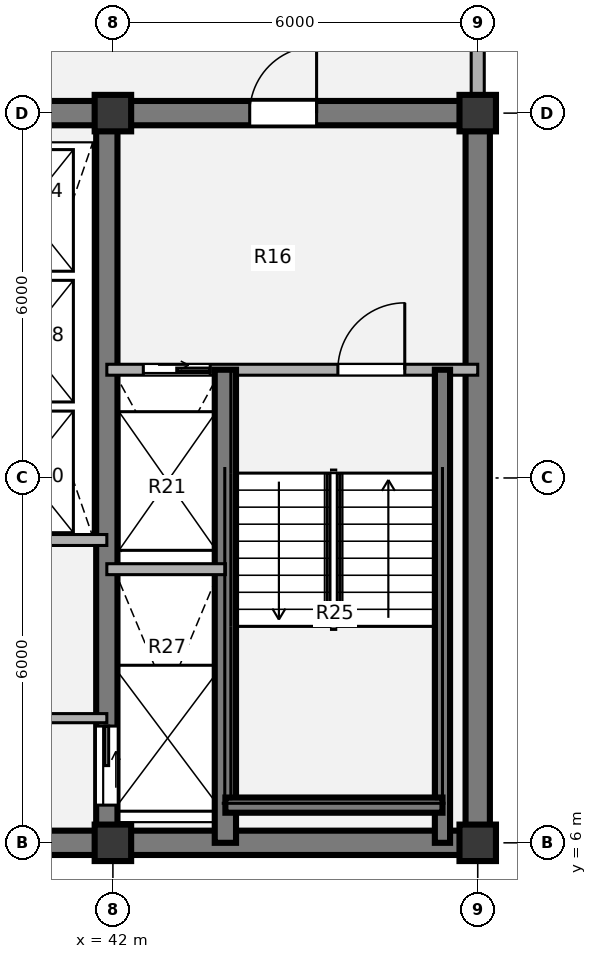
"""IFC4 building model, lengths in metres.
Left out: names, types, materials, properties, quantities, classifications, styles, units other than length and angle.
Written with IfcOpenShell. Run it as: python <this file> out.ifc"""

import sys

from ifc_helpers import new_model, si_unit, direction, frame, frame_2d, origin, origin_2d, place, context, subcontext, project, spatial, rectangle, extrude, source, transform, mapped, element, fill, save


model = new_model("IFC4")
c1 = context("Model", 3, precision=1e-05, world=origin(), true_north=direction((0.0, 1.0)))
c2 = subcontext(c1, "Body", "Model", "MODEL_VIEW")
j1 = project(units=[si_unit("LENGTHUNIT", "METRE"), si_unit("PLANEANGLEUNIT", "RADIAN")], contexts=[c1])
p1 = place(None, origin())
s1 = spatial("IfcSite", under=j1, at=p1, CompositionType="ELEMENT")
p2 = place(p1, origin())
s2 = spatial("IfcBuilding", under=s1, at=p2, CompositionType="ELEMENT")
p3 = place(p2, frame((0.0, 0.0, 279.72)))
s3 = spatial("IfcBuildingStorey", under=s2, at=p3, CompositionType="ELEMENT", Elevation=279.72)
m1 = source(origin(), c2, "Body", "SweptSolid", [
    extrude(rectangle(XDim=0.6, YDim=0.6, at=origin_2d()), origin(), (0.0, 0.0, 1.0), 3.78),
])
for number, where, z_axis, x_axis in (
    (1, (42.0, 6.0, 0.0), (0.0, 0.0, 1.0), (1.0, 0.0, 0.0)),
    (2, (48.0, 6.0, 0.0), (0.0, 0.0, 1.0), (1.0, 0.0, 0.0)),
    (3, (42.0, 18.0, 0.0), (0.0, 0.0, 1.0), (1.0, 0.0, 0.0)),
    (4, (48.0, 18.0, 0.0), (0.0, 0.0, 1.0), (1.0, 0.0, 0.0)),
):
    element("IfcColumn", number, at=place(p3, frame(where, z_axis=z_axis, x_axis=x_axis)), inside=s3, PredefinedType="COLUMN", context=c2, shape_type="MappedRepresentation", body=[
        mapped(m1, transform((0.0, 0.0, 0.0), x_axis=(1.0, 0.0, 0.0), y_axis=(0.0, 1.0, 0.0), z_axis=(0.0, 0.0, 1.0), scale=1.0)),
    ])
p4 = place(p3, frame((48.2, 6.0, 0.0), z_axis=(0.0, 0.0, 1.0), x_axis=(-1.0, 0.0, 0.0)))
e5 = element("IfcWall", 5, at=p4, inside=s3, PredefinedType="SHEAR", context=c2, shape_type="SweptSolid", body=[
    extrude(rectangle(XDim=24.4, YDim=0.4, at=frame_2d((12.2, 0.0))), origin(), (0.0, 0.0, 1.0), 3.78),
])
p5 = place(p3, frame((48.0, 18.0, 0.0), z_axis=(0.0, 0.0, 1.0), x_axis=(0.0, -1.0, 0.0)))
e6 = element("IfcWall", 6, at=p5, inside=s3, PredefinedType="SHEAR", context=c2, shape_type="SweptSolid", body=[
    extrude(rectangle(XDim=12.0, YDim=0.4, at=frame_2d((6.0, 0.0))), origin(), (0.0, 0.0, 1.0), 3.78),
])
p6 = place(p3, frame((38.8, 18.0, 0.0), z_axis=(0.0, 0.0, 1.0), x_axis=(1.0, 0.0, 0.0)))
e7 = element("IfcWall", 7, at=p6, inside=s3, PredefinedType="SHEAR", context=c2, shape_type="SweptSolid", body=[
    extrude(rectangle(XDim=9.4, YDim=0.4, at=frame_2d((4.7, 0.0))), origin(), (0.0, 0.0, 1.0), 3.78),
])
p7 = place(p6, frame((5.45, 0.0, 0.0)))
e8 = element("IfcOpeningElement", 8, at=p7, cuts=e7, PredefinedType="OPENING", context=c2, shape_type="SweptSolid", body=[
    extrude(rectangle(XDim=1.1, YDim=2.1, at=origin_2d()), frame((0.55, 0.21, 1.05), z_axis=(0.0, -1.0, 0.0), x_axis=(1.0, 0.0, 0.0)), (0.0, 0.0, 1.0), 0.42),
])
p8 = place(p3, frame((41.9, 18.0, 0.0), z_axis=(0.0, 0.0, 1.0), x_axis=(0.0, -1.0, 0.0)))
e9 = element("IfcWall", 9, at=p8, inside=s3, PredefinedType="SHEAR", context=c2, shape_type="SweptSolid", body=[
    extrude(rectangle(XDim=12.0, YDim=0.35, at=frame_2d((6.0, 0.0))), origin(), (0.0, 0.0, 1.0), 3.78),
])
p9 = place(p8, frame((10.08, 0.0, 0.0)))
e10 = element("IfcOpeningElement", 10, at=p9, cuts=e9, PredefinedType="OPENING", context=c2, shape_type="SweptSolid", body=[
    extrude(rectangle(XDim=1.3, YDim=2.1, at=origin_2d()), frame((0.65, 0.185, 1.05), z_axis=(0.0, -1.0, 0.0), x_axis=(1.0, 0.0, 0.0)), (0.0, 0.0, 1.0), 0.37),
])
p10 = place(p3, frame((48.0, 21.05, 0.0), z_axis=(0.0, 0.0, 1.0), x_axis=(0.0, -1.0, 0.0)))
e11 = element("IfcWall", 11, at=p10, inside=s3, PredefinedType="SOLIDWALL", context=c2, shape_type="SweptSolid", body=[
    extrude(rectangle(XDim=2.77, YDim=0.215, at=frame_2d((1.385, 0.0))), origin(), (0.0, 0.0, 1.0), 2.718),
])
p11 = place(p3, frame((38.0, 8.05, 0.0), z_axis=(0.0, 0.0, 1.0), x_axis=(1.0, 0.0, 0.0)))
e12 = element("IfcWall", 12, at=p11, inside=s3, PredefinedType="PARTITIONING", context=c2, shape_type="SweptSolid", body=[
    extrude(rectangle(XDim=3.9, YDim=0.15, at=frame_2d((1.95, 0.0))), origin(), (0.0, 0.0, 1.0), 3.5),
])
p12 = place(p11, frame((1.45, 0.0, 0.0)))
e13 = element("IfcOpeningElement", 13, at=p12, cuts=e12, PredefinedType="OPENING", context=c2, shape_type="SweptSolid", body=[
    extrude(rectangle(XDim=0.86, YDim=2.1, at=origin_2d()), frame((0.43, 0.085, 1.05), z_axis=(0.0, -1.0, 0.0), x_axis=(1.0, 0.0, 0.0)), (0.0, 0.0, 1.0), 0.17),
])
p13 = place(p3, frame((38.0, 10.98, 0.0), z_axis=(0.0, 0.0, 1.0), x_axis=(1.0, 0.0, 0.0)))
e14 = element("IfcWall", 14, at=p13, inside=s3, PredefinedType="PARTITIONING", context=c2, shape_type="SweptSolid", body=[
    extrude(rectangle(XDim=3.9, YDim=0.18, at=frame_2d((1.95, 0.0))), origin(), (0.0, 0.0, 1.0), 3.5),
])
p14 = place(p3, frame((41.9, 13.78, 0.0), z_axis=(0.0, 0.0, 1.0), x_axis=(1.0, 0.0, 0.0)))
e15 = element("IfcWall", 15, at=p14, inside=s3, PredefinedType="PARTITIONING", context=c2, shape_type="SweptSolid", body=[
    extrude(rectangle(XDim=6.1, YDim=0.18, at=frame_2d((3.05, 0.0))), origin(), (0.0, 0.0, 1.0), 3.5),
])
p15 = place(p14, frame((0.6, 0.0, 0.0)))
e16 = element("IfcOpeningElement", 16, at=p15, cuts=e15, PredefinedType="OPENING", context=c2, shape_type="SweptSolid", body=[
    extrude(rectangle(XDim=1.1, YDim=2.1, at=origin_2d()), frame((0.55, 0.1, 1.05), z_axis=(0.0, -1.0, 0.0), x_axis=(1.0, 0.0, 0.0)), (0.0, 0.0, 1.0), 0.2),
])
p16 = place(p14, frame((3.8, 0.0, 0.0)))
e17 = element("IfcOpeningElement", 17, at=p16, cuts=e15, PredefinedType="OPENING", context=c2, shape_type="SweptSolid", body=[
    extrude(rectangle(XDim=1.1, YDim=2.1, at=origin_2d()), frame((0.55, 0.1, 1.05), z_axis=(0.0, -1.0, 0.0), x_axis=(1.0, 0.0, 0.0)), (0.0, 0.0, 1.0), 0.2),
])
p17 = place(p3, frame((43.85, 6.0, 0.0), z_axis=(0.0, 0.0, 1.0), x_axis=(0.0, 1.0, 0.0)))
e18 = element("IfcWall", 18, at=p17, inside=s3, PredefinedType="SHEAR", context=c2, shape_type="SweptSolid", body=[
    extrude(rectangle(XDim=7.78, YDim=0.35, at=frame_2d((3.89, 0.0))), origin(), (0.0, 0.0, 1.0), 3.85),
])
p18 = place(p3, frame((47.42, 6.0, 0.0), z_axis=(0.0, 0.0, 1.0), x_axis=(0.0, 1.0, 0.0)))
e19 = element("IfcWall", 19, at=p18, inside=s3, PredefinedType="SHEAR", context=c2, shape_type="SweptSolid", body=[
    extrude(rectangle(XDim=7.78, YDim=0.25, at=frame_2d((3.89, 0.0))), origin(), (0.0, 0.0, 1.0), 3.85),
])
p19 = place(p3, frame((43.85, 6.62, 0.0), z_axis=(0.0, 0.0, 1.0), x_axis=(1.0, 0.0, 0.0)))
e20 = element("IfcWall", 20, at=p19, inside=s3, PredefinedType="SHEAR", context=c2, shape_type="SweptSolid", body=[
    extrude(rectangle(XDim=3.57, YDim=0.25, at=frame_2d((1.785, 0.0))), origin(), (0.0, 0.0, 1.0), 3.85),
])
p20 = place(p3, frame((41.9, 10.5, 0.0), z_axis=(0.0, 0.0, 1.0), x_axis=(1.0, 0.0, 0.0)))
e21 = element("IfcWall", 21, at=p20, inside=s3, PredefinedType="PARTITIONING", context=c2, shape_type="SweptSolid", body=[
    extrude(rectangle(XDim=1.95, YDim=0.18, at=frame_2d((0.975, 0.0))), origin(), (0.0, 0.0, 1.0), 3.5),
])
m2 = source(origin(), c2, "Body", "SweptSolid", [
    extrude(rectangle(XDim=1.1, YDim=2.1, at=origin_2d()), frame((0.55, 0.025, 1.05), z_axis=(0.0, -1.0, 0.0), x_axis=(1.0, 0.0, 0.0)), (0.0, 0.0, 1.0), 0.05),
])
p21 = place(p15, origin())
e22 = element("IfcDoor", 22, at=p21, inside=s3, OperationType="SLIDING_TO_RIGHT", PredefinedType="DOOR", context=c2, shape_type="MappedRepresentation", body=[
    mapped(m2, transform((0.0, 0.0, 0.0), x_axis=(1.0, 0.0, 0.0), y_axis=(0.0, 1.0, 0.0), z_axis=(0.0, 0.0, 1.0), scale=1.0)),
])
fill(e16, e22)
m3 = source(origin(), c2, "Body", "SweptSolid", [
    extrude(rectangle(XDim=1.1, YDim=2.1, at=origin_2d()), frame((0.55, 0.025, 1.05), z_axis=(0.0, -1.0, 0.0), x_axis=(1.0, 0.0, 0.0)), (0.0, 0.0, 1.0), 0.05),
])
p22 = place(p16, origin())
e23 = element("IfcDoor", 23, at=p22, inside=s3, OperationType="SINGLE_SWING_RIGHT", PredefinedType="DOOR", context=c2, shape_type="MappedRepresentation", body=[
    mapped(m3, transform((0.0, 0.0, 0.0), x_axis=(1.0, 0.0, 0.0), y_axis=(0.0, 1.0, 0.0), z_axis=(0.0, 0.0, 1.0), scale=1.0)),
])
fill(e17, e23)
m4 = source(origin(), c2, "Body", "SweptSolid", [
    extrude(rectangle(XDim=1.3, YDim=2.1, at=origin_2d()), frame((0.65, 0.025, 1.05), z_axis=(0.0, -1.0, 0.0), x_axis=(1.0, 0.0, 0.0)), (0.0, 0.0, 1.0), 0.05),
])
p23 = place(p9, origin())
e24 = element("IfcDoor", 24, at=p23, inside=s3, OperationType="SLIDING_TO_LEFT", PredefinedType="DOOR", context=c2, shape_type="MappedRepresentation", body=[
    mapped(m4, transform((0.0, 0.0, 0.0), x_axis=(1.0, 0.0, 0.0), y_axis=(0.0, 1.0, 0.0), z_axis=(0.0, 0.0, 1.0), scale=1.0)),
])
fill(e10, e24)
m5 = source(origin(), c2, "Body", "SweptSolid", [
    extrude(rectangle(XDim=1.1, YDim=2.1, at=origin_2d()), frame((0.55, 0.025, 1.05), z_axis=(0.0, -1.0, 0.0), x_axis=(1.0, 0.0, 0.0)), (0.0, 0.0, 1.0), 0.05),
])
p24 = place(p7, origin())
e25 = element("IfcDoor", 25, at=p24, inside=s3, OperationType="SINGLE_SWING_RIGHT", PredefinedType="DOOR", context=c2, shape_type="MappedRepresentation", body=[
    mapped(m5, transform((0.0, 0.0, 0.0), x_axis=(1.0, 0.0, 0.0), y_axis=(0.0, 1.0, 0.0), z_axis=(0.0, 0.0, 1.0), scale=1.0)),
])
fill(e8, e25)
save(model, sys.argv[1])
